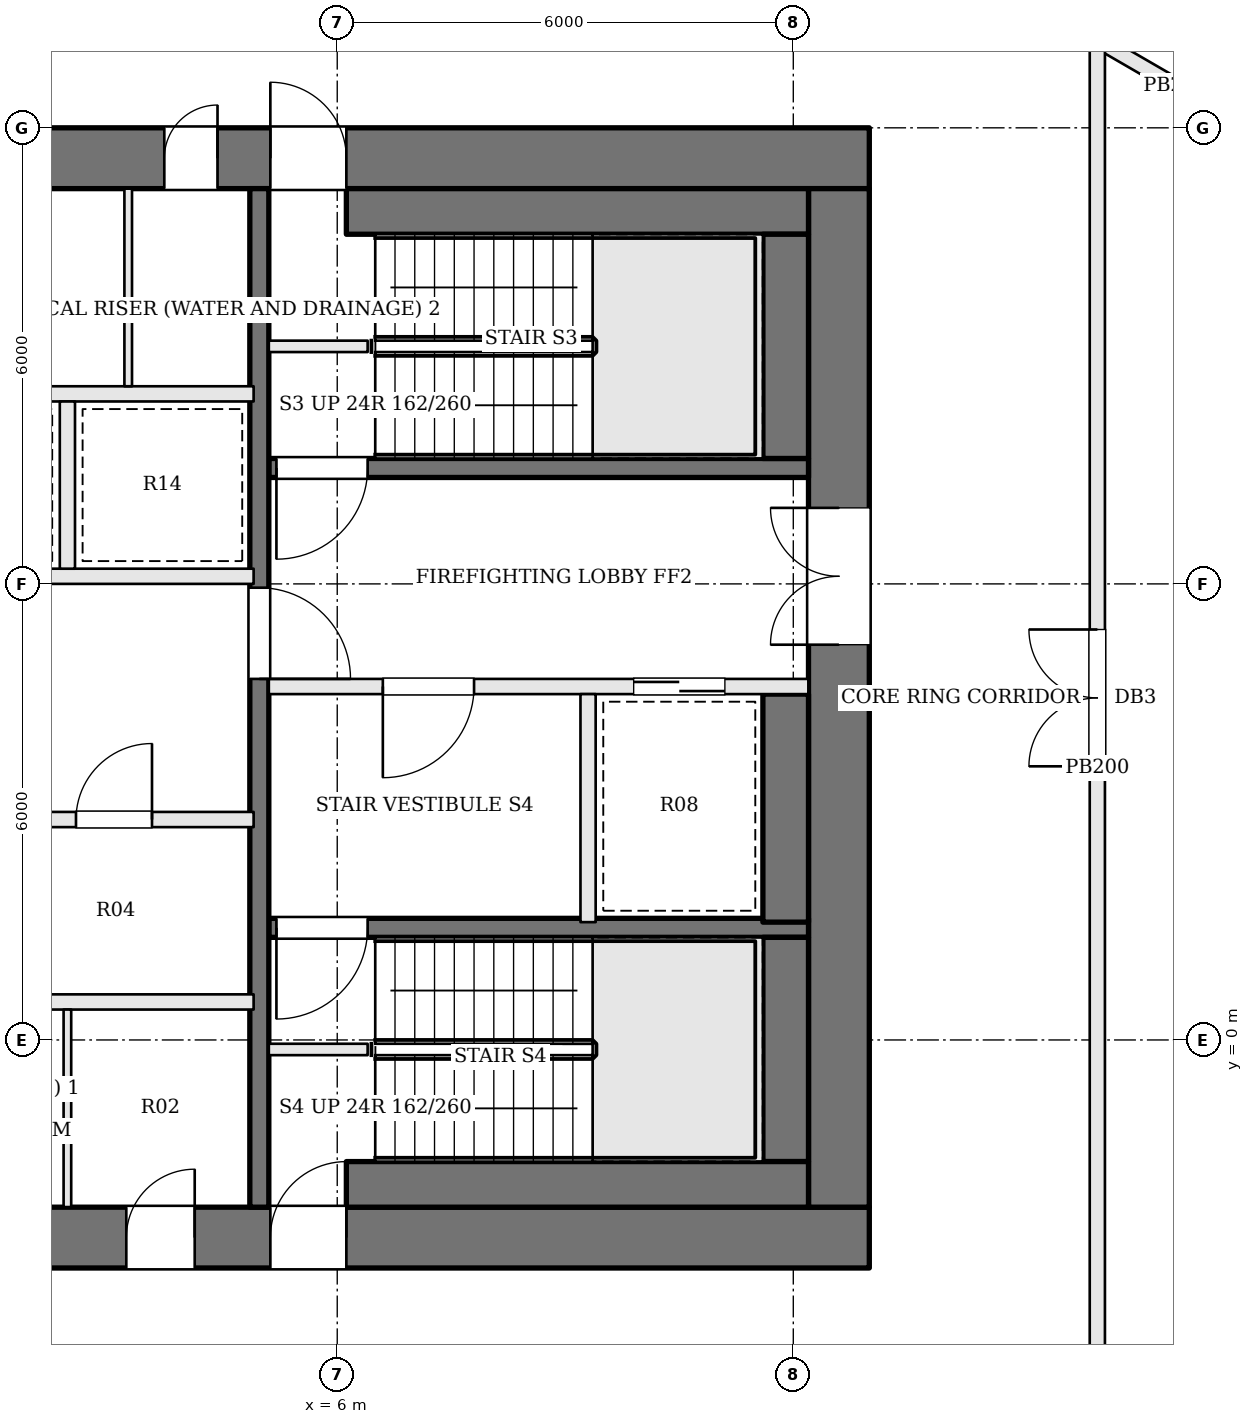
"""IFC4 building model, lengths in metres.
Left out: names, types, materials, properties, quantities, classifications, styles, units other than length and angle.
Written with IfcOpenShell. Run it as: python <this file> out.ifc"""

import sys

from ifc_helpers import new_model, si_unit, direction, frame, frame_2d, origin, place, context, subcontext, project, spatial, rectangle, extrude, element, fill, save


model = new_model("IFC4")
c1 = context("Model", 3, precision=1e-05, world=origin(), true_north=direction((0.0, 1.0)))
c2 = subcontext(c1, "Body", "Model", "MODEL_VIEW")
j1 = project(units=[si_unit("LENGTHUNIT", "METRE"), si_unit("PLANEANGLEUNIT", "RADIAN")], contexts=[c1])
p1 = place(None, origin())
s1 = spatial("IfcSite", under=j1, at=p1, CompositionType="ELEMENT")
p2 = place(p1, origin())
s2 = spatial("IfcBuilding", under=s1, at=p2, CompositionType="ELEMENT")
p3 = place(p2, frame((0.0, 0.0, 240.9)))
s3 = spatial("IfcBuildingStorey", under=s2, at=p3, CompositionType="ELEMENT", Elevation=240.9)
p4 = place(p3, frame((-13.0, 11.6, 0.0), z_axis=(0.0, 0.0, 1.0), x_axis=(1.0, 0.0, 0.0)))
e1 = element("IfcWall", 1, at=p4, inside=s3, PredefinedType="SHEAR", context=c2, shape_type="SweptSolid", body=[
    extrude(rectangle(XDim=26.0, YDim=0.8, at=frame_2d((13.0, 0.0))), origin(), (0.0, 0.0, 1.0), 3.9),
])
p5 = place(p4, frame((8.875, 0.0, 0.0)))
e2 = element("IfcOpeningElement", 2, at=p5, cuts=e1, PredefinedType="OPENING", context=c2, shape_type="SweptSolid", body=[
    extrude(rectangle(XDim=0.9, YDim=2.1, at=frame_2d((0.45, 1.05))), frame((0.0, 0.41, 0.0), z_axis=(0.0, -1.0, 0.0), x_axis=(1.0, 0.0, 0.0)), (0.0, 0.0, 1.0), 0.82),
])
p6 = place(p4, frame((11.425, 0.0, 0.0)))
e3 = element("IfcOpeningElement", 3, at=p6, cuts=e1, PredefinedType="OPENING", context=c2, shape_type="SweptSolid", body=[
    extrude(rectangle(XDim=0.7, YDim=2.1, at=frame_2d((0.35, 1.05))), frame((0.0, 0.41, 0.0), z_axis=(0.0, -1.0, 0.0), x_axis=(1.0, 0.0, 0.0)), (0.0, 0.0, 1.0), 0.82),
])
p7 = place(p4, frame((14.125, 0.0, 0.0)))
e4 = element("IfcOpeningElement", 4, at=p7, cuts=e1, PredefinedType="OPENING", context=c2, shape_type="SweptSolid", body=[
    extrude(rectangle(XDim=1.0, YDim=2.1, at=frame_2d((0.5, 1.05))), frame((0.0, 0.41, 0.0), z_axis=(0.0, -1.0, 0.0), x_axis=(1.0, 0.0, 0.0)), (0.0, 0.0, 1.0), 0.82),
])
p8 = place(p4, frame((16.725, 0.0, 0.0)))
e5 = element("IfcOpeningElement", 5, at=p8, cuts=e1, PredefinedType="OPENING", context=c2, shape_type="SweptSolid", body=[
    extrude(rectangle(XDim=0.7, YDim=2.1, at=frame_2d((0.35, 1.05))), frame((0.0, 0.41, 0.0), z_axis=(0.0, -1.0, 0.0), x_axis=(1.0, 0.0, 0.0)), (0.0, 0.0, 1.0), 0.82),
])
p9 = place(p4, frame((6.88, 0.0, 0.0)))
e6 = element("IfcOpeningElement", 6, at=p9, cuts=e1, PredefinedType="OPENING", context=c2, shape_type="SweptSolid", body=[
    extrude(rectangle(XDim=1.0, YDim=2.1, at=frame_2d((0.5, 1.05))), frame((0.0, 0.41, 0.0), z_axis=(0.0, -1.0, 0.0), x_axis=(1.0, 0.0, 0.0)), (0.0, 0.0, 1.0), 0.82),
])
p10 = place(p4, frame((18.12, 0.0, 0.0)))
e7 = element("IfcOpeningElement", 7, at=p10, cuts=e1, PredefinedType="OPENING", context=c2, shape_type="SweptSolid", body=[
    extrude(rectangle(XDim=1.0, YDim=2.1, at=frame_2d((0.5, 1.05))), frame((0.0, 0.41, 0.0), z_axis=(0.0, -1.0, 0.0), x_axis=(1.0, 0.0, 0.0)), (0.0, 0.0, 1.0), 0.82),
])
p11 = place(p3, frame((-13.0, -2.6, 0.0), z_axis=(0.0, 0.0, 1.0), x_axis=(1.0, 0.0, 0.0)))
e8 = element("IfcWall", 8, at=p11, inside=s3, PredefinedType="SHEAR", context=c2, shape_type="SweptSolid", body=[
    extrude(rectangle(XDim=26.0, YDim=0.8, at=frame_2d((13.0, 0.0))), origin(), (0.0, 0.0, 1.0), 3.9),
])
p12 = place(p11, frame((9.225, 0.0, 0.0)))
e9 = element("IfcOpeningElement", 9, at=p12, cuts=e8, PredefinedType="OPENING", context=c2, shape_type="SweptSolid", body=[
    extrude(rectangle(XDim=1.0, YDim=2.1, at=frame_2d((0.5, 1.05))), frame((0.0, 0.41, 0.0), z_axis=(0.0, -1.0, 0.0), x_axis=(1.0, 0.0, 0.0)), (0.0, 0.0, 1.0), 0.82),
])
p13 = place(p11, frame((11.825, 0.0, 0.0)))
e10 = element("IfcOpeningElement", 10, at=p13, cuts=e8, PredefinedType="OPENING", context=c2, shape_type="SweptSolid", body=[
    extrude(rectangle(XDim=0.7, YDim=2.1, at=frame_2d((0.35, 1.05))), frame((0.0, 0.41, 0.0), z_axis=(0.0, -1.0, 0.0), x_axis=(1.0, 0.0, 0.0)), (0.0, 0.0, 1.0), 0.82),
])
p14 = place(p11, frame((13.875, 0.0, 0.0)))
e11 = element("IfcOpeningElement", 11, at=p14, cuts=e8, PredefinedType="OPENING", context=c2, shape_type="SweptSolid", body=[
    extrude(rectangle(XDim=0.7, YDim=2.1, at=frame_2d((0.35, 1.05))), frame((0.0, 0.41, 0.0), z_axis=(0.0, -1.0, 0.0), x_axis=(1.0, 0.0, 0.0)), (0.0, 0.0, 1.0), 0.82),
])
p15 = place(p11, frame((16.225, 0.0, 0.0)))
e12 = element("IfcOpeningElement", 12, at=p15, cuts=e8, PredefinedType="OPENING", context=c2, shape_type="SweptSolid", body=[
    extrude(rectangle(XDim=0.9, YDim=2.1, at=frame_2d((0.45, 1.05))), frame((0.0, 0.41, 0.0), z_axis=(0.0, -1.0, 0.0), x_axis=(1.0, 0.0, 0.0)), (0.0, 0.0, 1.0), 0.82),
])
p16 = place(p11, frame((6.88, 0.0, 0.0)))
e13 = element("IfcOpeningElement", 13, at=p16, cuts=e8, PredefinedType="OPENING", context=c2, shape_type="SweptSolid", body=[
    extrude(rectangle(XDim=1.0, YDim=2.1, at=frame_2d((0.5, 1.05))), frame((0.0, 0.41, 0.0), z_axis=(0.0, -1.0, 0.0), x_axis=(1.0, 0.0, 0.0)), (0.0, 0.0, 1.0), 0.82),
])
p17 = place(p11, frame((18.12, 0.0, 0.0)))
e14 = element("IfcOpeningElement", 14, at=p17, cuts=e8, PredefinedType="OPENING", context=c2, shape_type="SweptSolid", body=[
    extrude(rectangle(XDim=1.0, YDim=2.1, at=frame_2d((0.5, 1.05))), frame((0.0, 0.41, 0.0), z_axis=(0.0, -1.0, 0.0), x_axis=(1.0, 0.0, 0.0)), (0.0, 0.0, 1.0), 0.82),
])
p18 = place(p3, frame((12.6, -2.2, 0.0), z_axis=(0.0, 0.0, 1.0), x_axis=(0.0, 1.0, 0.0)))
e15 = element("IfcWall", 15, at=p18, inside=s3, PredefinedType="SHEAR", context=c2, shape_type="SweptSolid", body=[
    extrude(rectangle(XDim=13.4, YDim=0.8, at=frame_2d((6.7, 0.0))), origin(), (0.0, 0.0, 1.0), 3.9),
])
p19 = place(p18, frame((7.4, 0.0, 0.0)))
e16 = element("IfcOpeningElement", 16, at=p19, cuts=e15, PredefinedType="OPENING", context=c2, shape_type="SweptSolid", body=[
    extrude(rectangle(XDim=1.8, YDim=2.1, at=frame_2d((0.9, 1.05))), frame((0.0, 0.41, 0.0), z_axis=(0.0, -1.0, 0.0), x_axis=(1.0, 0.0, 0.0)), (0.0, 0.0, 1.0), 0.82),
])
for number, where, z_axis, x_axis in (
    (17, (6.4, 9.125, 0.0), (0.0, 0.0, 1.0), (-1.0, 0.0, 0.0)),
    (18, (6.4, -0.125, 0.0), (0.0, 0.0, 1.0), (-1.0, 0.0, 0.0)),
):
    element("IfcWall", number, at=place(p3, frame(where, z_axis=z_axis, x_axis=x_axis)), inside=s3, PredefinedType="SOLIDWALL", context=c2, shape_type="SweptSolid", body=[
        extrude(rectangle(XDim=1.3, YDim=0.15, at=frame_2d((0.65, 0.0))), origin(), (0.0, 0.0, 1.0), 3.7),
    ])
p20 = place(p3, frame((12.2, 7.525, 0.0), z_axis=(0.0, 0.0, 1.0), x_axis=(-1.0, 0.0, 0.0)))
e19 = element("IfcWall", 19, at=p20, inside=s3, PredefinedType="SOLIDWALL", context=c2, shape_type="SweptSolid", body=[
    extrude(rectangle(XDim=7.1, YDim=0.25, at=frame_2d((3.55, 0.0))), origin(), (0.0, 0.0, 1.0), 3.7),
])
p21 = place(p20, frame((5.8, 0.0, 0.0)))
e20 = element("IfcOpeningElement", 20, at=p21, cuts=e19, PredefinedType="OPENING", context=c2, shape_type="SweptSolid", body=[
    extrude(rectangle(XDim=1.2, YDim=2.1, at=frame_2d((0.6, 1.05))), frame((0.0, 0.135, 0.0), z_axis=(0.0, -1.0, 0.0), x_axis=(1.0, 0.0, 0.0)), (0.0, 0.0, 1.0), 0.27),
])
p22 = place(p3, frame((12.2, 4.65, 0.0), z_axis=(0.0, 0.0, 1.0), x_axis=(-1.0, 0.0, 0.0)))
e21 = element("IfcWall", 21, at=p22, inside=s3, PredefinedType="SOLIDWALL", context=c2, shape_type="SweptSolid", body=[
    extrude(rectangle(XDim=7.1, YDim=0.2, at=frame_2d((3.55, 0.0))), origin(), (0.0, 0.0, 1.0), 3.7),
])
p23 = place(p22, frame((4.4, 0.0, 0.0)))
e22 = element("IfcOpeningElement", 22, at=p23, cuts=e21, PredefinedType="OPENING", context=c2, shape_type="SweptSolid", body=[
    extrude(rectangle(XDim=1.2, YDim=2.1, at=frame_2d((0.6, 1.05))), frame((0.0, 0.11, 0.0), z_axis=(0.0, -1.0, 0.0), x_axis=(1.0, 0.0, 0.0)), (0.0, 0.0, 1.0), 0.22),
])
p24 = place(p22, frame((1.1, 0.0, 0.0)))
e23 = element("IfcOpeningElement", 23, at=p24, cuts=e21, PredefinedType="OPENING", context=c2, shape_type="SweptSolid", body=[
    extrude(rectangle(XDim=1.2, YDim=2.1, at=frame_2d((0.6, 1.05))), frame((0.0, 0.11, 0.0), z_axis=(0.0, -1.0, 0.0), x_axis=(1.0, 0.0, 0.0)), (0.0, 0.0, 1.0), 0.22),
])
p25 = place(p3, frame((12.2, 1.475, 0.0), z_axis=(0.0, 0.0, 1.0), x_axis=(-1.0, 0.0, 0.0)))
e24 = element("IfcWall", 24, at=p25, inside=s3, PredefinedType="SOLIDWALL", context=c2, shape_type="SweptSolid", body=[
    extrude(rectangle(XDim=7.1, YDim=0.25, at=frame_2d((3.55, 0.0))), origin(), (0.0, 0.0, 1.0), 3.7),
])
p26 = place(p25, frame((5.8, 0.0, 0.0)))
e25 = element("IfcOpeningElement", 25, at=p26, cuts=e24, PredefinedType="OPENING", context=c2, shape_type="SweptSolid", body=[
    extrude(rectangle(XDim=1.2, YDim=2.1, at=frame_2d((0.6, 1.05))), frame((0.0, 0.135, 0.0), z_axis=(0.0, -1.0, 0.0), x_axis=(1.0, 0.0, 0.0)), (0.0, 0.0, 1.0), 0.27),
])
p27 = place(p3, frame((9.3, 4.55, 0.0), z_axis=(0.0, 0.0, 1.0), x_axis=(0.0, -1.0, 0.0)))
e26 = element("IfcWall", 26, at=p27, inside=s3, PredefinedType="SOLIDWALL", context=c2, shape_type="SweptSolid", body=[
    extrude(rectangle(XDim=3.0, YDim=0.2, at=frame_2d((1.5, 0.0))), origin(), (0.0, 0.0, 1.0), 3.7),
])
p28 = place(p3, frame((4.975, 11.2, 0.0), z_axis=(0.0, 0.0, 1.0), x_axis=(0.0, -1.0, 0.0)))
e27 = element("IfcWall", 27, at=p28, inside=s3, PredefinedType="SOLIDWALL", context=c2, shape_type="SweptSolid", body=[
    extrude(rectangle(XDim=13.4, YDim=0.25, at=frame_2d((6.7, 0.0))), origin(), (0.0, 0.0, 1.0), 3.7),
])
p29 = place(p28, frame((5.25, 0.0, 0.0)))
e28 = element("IfcOpeningElement", 28, at=p29, cuts=e27, PredefinedType="OPENING", context=c2, shape_type="SweptSolid", body=[
    extrude(rectangle(XDim=1.2, YDim=2.1, at=frame_2d((0.6, 1.05))), frame((0.0, 0.135, 0.0), z_axis=(0.0, -1.0, 0.0), x_axis=(1.0, 0.0, 0.0)), (0.0, 0.0, 1.0), 0.27),
])
p30 = place(p3, frame((12.2, 10.9, 0.0), z_axis=(0.0, 0.0, 1.0), x_axis=(-1.0, 0.0, 0.0)))
e29 = element("IfcWall", 29, at=p30, inside=s3, PredefinedType="SOLIDWALL", context=c2, shape_type="SweptSolid", body=[
    extrude(rectangle(XDim=6.08, YDim=0.6, at=frame_2d((3.04, 0.0))), origin(), (0.0, 0.0, 1.0), 3.7),
])
p31 = place(p3, frame((11.9, 10.6, 0.0), z_axis=(0.0, 0.0, 1.0), x_axis=(0.0, -1.0, 0.0)))
e30 = element("IfcWall", 30, at=p31, inside=s3, PredefinedType="SOLIDWALL", context=c2, shape_type="SweptSolid", body=[
    extrude(rectangle(XDim=2.95, YDim=0.6, at=frame_2d((1.475, 0.0))), origin(), (0.0, 0.0, 1.0), 3.7),
])
p32 = place(p3, frame((11.9, 4.55, 0.0), z_axis=(0.0, 0.0, 1.0), x_axis=(0.0, -1.0, 0.0)))
e31 = element("IfcWall", 31, at=p32, inside=s3, PredefinedType="SOLIDWALL", context=c2, shape_type="SweptSolid", body=[
    extrude(rectangle(XDim=3.0, YDim=0.6, at=frame_2d((1.5, 0.0))), origin(), (0.0, 0.0, 1.0), 3.7),
])
p33 = place(p3, frame((11.9, 1.35, 0.0), z_axis=(0.0, 0.0, 1.0), x_axis=(0.0, -1.0, 0.0)))
e32 = element("IfcWall", 32, at=p33, inside=s3, PredefinedType="SOLIDWALL", context=c2, shape_type="SweptSolid", body=[
    extrude(rectangle(XDim=2.95, YDim=0.6, at=frame_2d((1.475, 0.0))), origin(), (0.0, 0.0, 1.0), 3.7),
])
p34 = place(p3, frame((12.2, -1.9, 0.0), z_axis=(0.0, 0.0, 1.0), x_axis=(-1.0, 0.0, 0.0)))
e33 = element("IfcWall", 33, at=p34, inside=s3, PredefinedType="SOLIDWALL", context=c2, shape_type="SweptSolid", body=[
    extrude(rectangle(XDim=6.08, YDim=0.6, at=frame_2d((3.04, 0.0))), origin(), (0.0, 0.0, 1.0), 3.7),
])
p35 = place(p3, frame((-4.9, 0.5, 0.0), z_axis=(0.0, 0.0, 1.0), x_axis=(1.0, 0.0, 0.0)))
e34 = element("IfcWall", 34, at=p35, inside=s3, PredefinedType="SOLIDWALL", context=c2, shape_type="SweptSolid", body=[
    extrude(rectangle(XDim=9.8, YDim=0.2, at=frame_2d((4.9, 0.0))), origin(), (0.0, 0.0, 1.0), 3.7),
])
p36 = place(p3, frame((-4.9, 2.9, 0.0), z_axis=(0.0, 0.0, 1.0), x_axis=(1.0, 0.0, 0.0)))
e35 = element("IfcWall", 35, at=p36, inside=s3, PredefinedType="SOLIDWALL", context=c2, shape_type="SweptSolid", body=[
    extrude(rectangle(XDim=9.8, YDim=0.2, at=frame_2d((4.9, 0.0))), origin(), (0.0, 0.0, 1.0), 3.7),
])
p37 = place(p36, frame((2.613, 0.0, 0.0)))
e36 = element("IfcOpeningElement", 36, at=p37, cuts=e35, PredefinedType="OPENING", context=c2, shape_type="SweptSolid", body=[
    extrude(rectangle(XDim=0.9, YDim=2.1, at=frame_2d((0.45, 1.05))), frame((0.0, 0.11, 0.0), z_axis=(0.0, -1.0, 0.0), x_axis=(1.0, 0.0, 0.0)), (0.0, 0.0, 1.0), 0.22),
])
p38 = place(p36, frame((7.463, 0.0, 0.0)))
e37 = element("IfcOpeningElement", 37, at=p38, cuts=e35, PredefinedType="OPENING", context=c2, shape_type="SweptSolid", body=[
    extrude(rectangle(XDim=1.0, YDim=2.1, at=frame_2d((0.5, 1.05))), frame((0.0, 0.11, 0.0), z_axis=(0.0, -1.0, 0.0), x_axis=(1.0, 0.0, 0.0)), (0.0, 0.0, 1.0), 0.22),
])
for number, where, z_axis, x_axis in (
    (38, (-4.9, 6.1, 0.0), (0.0, 0.0, 1.0), (1.0, 0.0, 0.0)),
    (39, (-4.9, 8.5, 0.0), (0.0, 0.0, 1.0), (1.0, 0.0, 0.0)),
):
    element("IfcWall", number, at=place(p3, frame(where, z_axis=z_axis, x_axis=x_axis)), inside=s3, PredefinedType="SOLIDWALL", context=c2, shape_type="SweptSolid", body=[
        extrude(rectangle(XDim=9.8, YDim=0.2, at=frame_2d((4.9, 0.0))), origin(), (0.0, 0.0, 1.0), 3.7),
    ])
p39 = place(p3, frame((2.45, 6.2, 0.0), z_axis=(0.0, 0.0, 1.0), x_axis=(0.0, 1.0, 0.0)))
e40 = element("IfcWall", 40, at=p39, inside=s3, PredefinedType="SOLIDWALL", context=c2, shape_type="SweptSolid", body=[
    extrude(rectangle(XDim=2.2, YDim=0.2, at=frame_2d((1.1, 0.0))), origin(), (0.0, 0.0, 1.0), 3.7),
])
for number, where, z_axis, x_axis in (
    (41, (2.45, -2.2, 0.0), (0.0, 0.0, 1.0), (0.0, 1.0, 0.0)),
    (42, (3.25, 8.6, 0.0), (0.0, 0.0, 1.0), (0.0, 1.0, 0.0)),
):
    element("IfcWall", number, at=place(p3, frame(where, z_axis=z_axis, x_axis=x_axis)), inside=s3, PredefinedType="PARTITIONING", context=c2, shape_type="SweptSolid", body=[
        extrude(rectangle(XDim=2.6, YDim=0.1, at=frame_2d((1.3, 0.0))), origin(), (0.0, 0.0, 1.0), 3.7),
    ])
p40 = place(p3, frame((15.913, 13.202, 0.0), z_axis=(0.0, 0.0, 1.0), x_axis=(0.86524014554, -0.501357647339, 0.0)))
e43 = element("IfcWall", 43, at=p40, inside=s3, PredefinedType="PARTITIONING", context=c2, shape_type="SweptSolid", body=[
    extrude(rectangle(XDim=2.575, YDim=0.2, at=frame_2d((1.288, 0.0))), origin(), (0.0, 0.0, 1.0), 3.7),
])
p41 = place(p3, frame((16.0, -5.9, 0.0), z_axis=(0.0, 0.0, 1.0), x_axis=(0.0, 1.0, 0.0)))
e44 = element("IfcWall", 44, at=p41, inside=s3, PredefinedType="PARTITIONING", context=c2, shape_type="SweptSolid", body=[
    extrude(rectangle(XDim=18.952, YDim=0.2, at=frame_2d((9.476, 0.0))), origin(), (0.0, 0.0, 1.0), 3.7),
])
p42 = place(p41, frame((9.5, 0.0, 0.0)))
e45 = element("IfcOpeningElement", 45, at=p42, cuts=e44, PredefinedType="OPENING", context=c2, shape_type="SweptSolid", body=[
    extrude(rectangle(XDim=1.8, YDim=2.1, at=frame_2d((0.9, 1.05))), frame((0.0, 0.11, 0.0), z_axis=(0.0, -1.0, 0.0), x_axis=(1.0, 0.0, 0.0)), (0.0, 0.0, 1.0), 0.22),
])
p43 = place(p19, origin())
e46 = element("IfcDoor", 46, at=p43, inside=s3, OperationType="DOUBLE_DOOR_SINGLE_SWING", PredefinedType="DOOR", context=c2, shape_type="SweptSolid", body=[
    extrude(rectangle(XDim=1.8, YDim=2.1, at=frame_2d((0.9, 1.05))), frame((0.0, 0.025, 0.0), z_axis=(0.0, -1.0, 0.0), x_axis=(1.0, 0.0, 0.0)), (0.0, 0.0, 1.0), 0.05),
])
fill(e16, e46)
p44 = place(p29, origin())
e47 = element("IfcDoor", 47, at=p44, inside=s3, OperationType="SINGLE_SWING_RIGHT", PredefinedType="DOOR", context=c2, shape_type="SweptSolid", body=[
    extrude(rectangle(XDim=1.2, YDim=2.1, at=frame_2d((0.6, 1.05))), frame((0.0, 0.025, 0.0), z_axis=(0.0, -1.0, 0.0), x_axis=(1.0, 0.0, 0.0)), (0.0, 0.0, 1.0), 0.05),
])
fill(e28, e47)
p45 = place(p23, origin())
e48 = element("IfcDoor", 48, at=p45, inside=s3, OperationType="SINGLE_SWING_RIGHT", PredefinedType="DOOR", context=c2, shape_type="SweptSolid", body=[
    extrude(rectangle(XDim=1.2, YDim=2.1, at=frame_2d((0.6, 1.05))), frame((0.0, 0.025, 0.0), z_axis=(0.0, -1.0, 0.0), x_axis=(1.0, 0.0, 0.0)), (0.0, 0.0, 1.0), 0.05),
])
fill(e22, e48)
p46 = place(p21, origin())
e49 = element("IfcDoor", 49, at=p46, inside=s3, OperationType="SINGLE_SWING_RIGHT", PredefinedType="DOOR", context=c2, shape_type="SweptSolid", body=[
    extrude(rectangle(XDim=1.2, YDim=2.1, at=frame_2d((0.6, 1.05))), frame((0.0, 0.025, 0.0), z_axis=(0.0, -1.0, 0.0), x_axis=(1.0, 0.0, 0.0)), (0.0, 0.0, 1.0), 0.05),
])
fill(e20, e49)
p47 = place(p26, origin())
e50 = element("IfcDoor", 50, at=p47, inside=s3, OperationType="SINGLE_SWING_RIGHT", PredefinedType="DOOR", context=c2, shape_type="SweptSolid", body=[
    extrude(rectangle(XDim=1.2, YDim=2.1, at=frame_2d((0.6, 1.05))), frame((0.0, 0.025, 0.0), z_axis=(0.0, -1.0, 0.0), x_axis=(1.0, 0.0, 0.0)), (0.0, 0.0, 1.0), 0.05),
])
fill(e25, e50)
p48 = place(p24, origin())
e51 = element("IfcDoor", 51, at=p48, inside=s3, OperationType="SLIDING_TO_RIGHT", PredefinedType="DOOR", context=c2, shape_type="SweptSolid", body=[
    extrude(rectangle(XDim=1.2, YDim=2.1, at=frame_2d((0.6, 1.05))), frame((0.0, 0.025, 0.0), z_axis=(0.0, -1.0, 0.0), x_axis=(1.0, 0.0, 0.0)), (0.0, 0.0, 1.0), 0.05),
])
fill(e23, e51)
p49 = place(p38, origin())
e52 = element("IfcDoor", 52, at=p49, inside=s3, OperationType="SINGLE_SWING_RIGHT", PredefinedType="DOOR", context=c2, shape_type="SweptSolid", body=[
    extrude(rectangle(XDim=1.0, YDim=2.1, at=frame_2d((0.5, 1.05))), frame((0.0, 0.025, 0.0), z_axis=(0.0, -1.0, 0.0), x_axis=(1.0, 0.0, 0.0)), (0.0, 0.0, 1.0), 0.05),
])
fill(e37, e52)
p50 = place(p15, origin())
e53 = element("IfcDoor", 53, at=p50, inside=s3, OperationType="SINGLE_SWING_RIGHT", PredefinedType="DOOR", context=c2, shape_type="SweptSolid", body=[
    extrude(rectangle(XDim=0.9, YDim=2.1, at=frame_2d((0.45, 1.05))), frame((0.0, 0.025, 0.0), z_axis=(0.0, -1.0, 0.0), x_axis=(1.0, 0.0, 0.0)), (0.0, 0.0, 1.0), 0.05),
])
fill(e12, e53)
p51 = place(p8, origin())
e54 = element("IfcDoor", 54, at=p51, inside=s3, OperationType="SINGLE_SWING_RIGHT", PredefinedType="DOOR", context=c2, shape_type="SweptSolid", body=[
    extrude(rectangle(XDim=0.7, YDim=2.1, at=frame_2d((0.35, 1.05))), frame((0.0, 0.025, 0.0), z_axis=(0.0, -1.0, 0.0), x_axis=(1.0, 0.0, 0.0)), (0.0, 0.0, 1.0), 0.05),
])
fill(e5, e54)
p52 = place(p10, origin())
e55 = element("IfcDoor", 55, at=p52, inside=s3, OperationType="SINGLE_SWING_LEFT", PredefinedType="DOOR", context=c2, shape_type="SweptSolid", body=[
    extrude(rectangle(XDim=1.0, YDim=2.1, at=frame_2d((0.5, 1.05))), frame((0.0, 0.025, 0.0), z_axis=(0.0, -1.0, 0.0), x_axis=(1.0, 0.0, 0.0)), (0.0, 0.0, 1.0), 0.05),
])
fill(e7, e55)
p53 = place(p17, origin())
e56 = element("IfcDoor", 56, at=p53, inside=s3, OperationType="SINGLE_SWING_RIGHT", PredefinedType="DOOR", context=c2, shape_type="SweptSolid", body=[
    extrude(rectangle(XDim=1.0, YDim=2.1, at=frame_2d((0.5, 1.05))), frame((0.0, 0.025, 0.0), z_axis=(0.0, -1.0, 0.0), x_axis=(1.0, 0.0, 0.0)), (0.0, 0.0, 1.0), 0.05),
])
fill(e14, e56)
p54 = place(p42, origin())
e57 = element("IfcDoor", 57, at=p54, inside=s3, OperationType="DOUBLE_DOOR_SINGLE_SWING", PredefinedType="DOOR", context=c2, shape_type="SweptSolid", body=[
    extrude(rectangle(XDim=1.8, YDim=2.1, at=frame_2d((0.9, 1.05))), frame((0.0, 0.025, 0.0), z_axis=(0.0, -1.0, 0.0), x_axis=(1.0, 0.0, 0.0)), (0.0, 0.0, 1.0), 0.05),
])
fill(e45, e57)
save(model, sys.argv[1])
